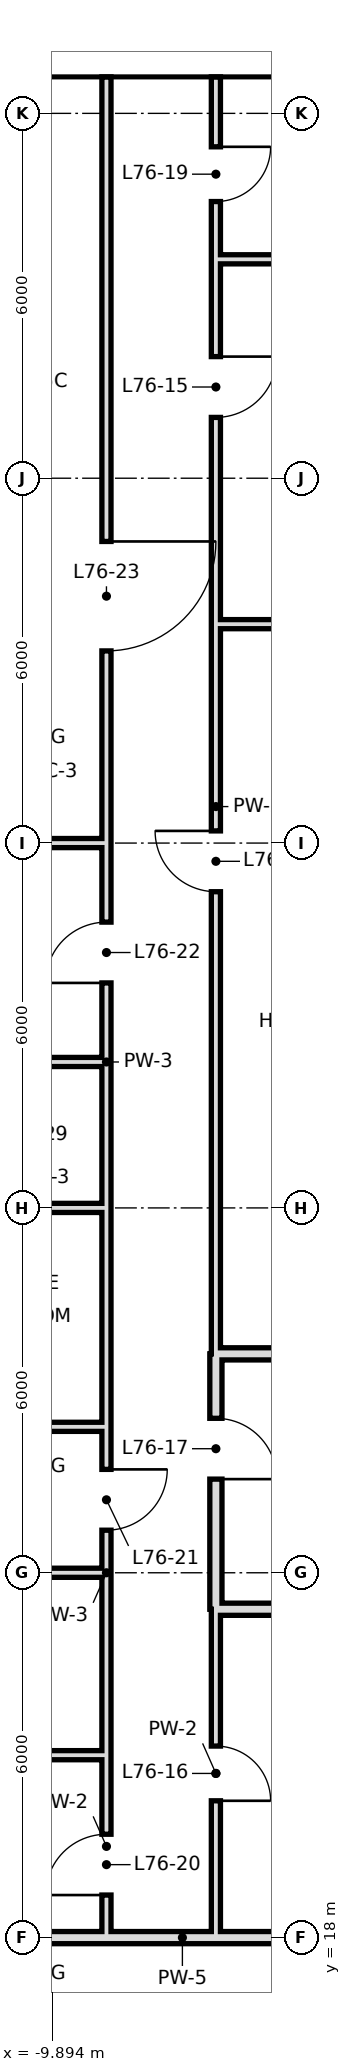
"""IFC4 building model, lengths in metres.
Left out: names, types, materials, properties, quantities, classifications, styles, units other than length and angle.
Written with IfcOpenShell. Run it as: python <this file> out.ifc"""

import sys

from ifc_helpers import new_model, si_unit, direction, frame, frame_2d, origin, place, context, subcontext, project, spatial, rectangle, extrude, element, fill, save


model = new_model("IFC4")
c1 = context("Model", 3, precision=1e-05, world=origin(), true_north=direction((0.0, 1.0)))
c2 = subcontext(c1, "Body", "Model", "MODEL_VIEW")
j1 = project(units=[si_unit("LENGTHUNIT", "METRE"), si_unit("PLANEANGLEUNIT", "RADIAN")], contexts=[c1])
p1 = place(None, origin())
s1 = spatial("IfcSite", under=j1, at=p1, CompositionType="ELEMENT")
p2 = place(p1, origin())
s2 = spatial("IfcBuilding", under=s1, at=p2, CompositionType="ELEMENT")
p3 = place(p2, frame((0.0, 0.0, 319.6)))
s3 = spatial("IfcBuildingStorey", under=s2, at=p3, CompositionType="ELEMENT", Elevation=319.6)
p4 = place(p3, frame((-7.2, 23.4, 0.0), z_axis=(0.0, 0.0, 1.0), x_axis=(0.0, 1.0, 0.0)))
e1 = element("IfcWall", 1, at=p4, inside=s3, PredefinedType="SOLIDWALL", context=c2, shape_type="SweptSolid", body=[
    extrude(rectangle(XDim=4.2, YDim=0.2, at=frame_2d((2.1, 0.0))), origin(), (0.0, 0.0, 1.0), 2.72),
])
p5 = place(p4, frame((2.14, 0.0, 0.0)))
e2 = element("IfcOpeningElement", 2, at=p5, cuts=e1, PredefinedType="OPENING", context=c2, shape_type="SweptSolid", body=[
    extrude(rectangle(XDim=1.0, YDim=2.4, at=frame_2d((0.5, 1.2))), frame((0.0, 0.11, 0.0), z_axis=(0.0, -1.0, 0.0), x_axis=(1.0, 0.0, 0.0)), (0.0, 0.0, 1.0), 0.22),
])
p6 = place(p3, frame((-7.2, 18.0, 0.0), z_axis=(0.0, 0.0, 1.0), x_axis=(0.0, 1.0, 0.0)))
e3 = element("IfcWall", 3, at=p6, inside=s3, PredefinedType="PARTITIONING", context=c2, shape_type="SweptSolid", body=[
    extrude(rectangle(XDim=5.4, YDim=0.15, at=frame_2d((2.7, 0.0))), origin(), (0.0, 0.0, 1.0), 3.42),
])
p7 = place(p6, frame((2.25, 0.0, 0.0)))
e4 = element("IfcOpeningElement", 4, at=p7, cuts=e3, PredefinedType="OPENING", context=c2, shape_type="SweptSolid", body=[
    extrude(rectangle(XDim=0.9, YDim=2.1, at=frame_2d((0.45, 1.05))), frame((0.0, 0.085, 0.0), z_axis=(0.0, -1.0, 0.0), x_axis=(1.0, 0.0, 0.0)), (0.0, 0.0, 1.0), 0.17),
])
p8 = place(p3, frame((-7.2, 27.6, 0.0), z_axis=(0.0, 0.0, 1.0), x_axis=(0.0, 1.0, 0.0)))
e5 = element("IfcWall", 5, at=p8, inside=s3, PredefinedType="PARTITIONING", context=c2, shape_type="SweptSolid", body=[
    extrude(rectangle(XDim=18.0, YDim=0.15, at=frame_2d((9.0, 0.0))), origin(), (0.0, 0.0, 1.0), 3.42),
])
p9 = place(p8, frame((15.4, 0.0, 0.0)))
e6 = element("IfcOpeningElement", 6, at=p9, cuts=e5, PredefinedType="OPENING", context=c2, shape_type="SweptSolid", body=[
    extrude(rectangle(XDim=1.0, YDim=2.4, at=frame_2d((0.5, 1.2))), frame((0.0, 0.085, 0.0), z_axis=(0.0, -1.0, 0.0), x_axis=(1.0, 0.0, 0.0)), (0.0, 0.0, 1.0), 0.17),
])
p10 = place(p8, frame((7.6, 0.0, 0.0)))
e7 = element("IfcOpeningElement", 7, at=p10, cuts=e5, PredefinedType="OPENING", context=c2, shape_type="SweptSolid", body=[
    extrude(rectangle(XDim=1.0, YDim=2.4, at=frame_2d((0.5, 1.2))), frame((0.0, 0.085, 0.0), z_axis=(0.0, -1.0, 0.0), x_axis=(1.0, 0.0, 0.0)), (0.0, 0.0, 1.0), 0.17),
])
p11 = place(p3, frame((-7.2, 45.6, 0.0), z_axis=(0.0, 0.0, 1.0), x_axis=(0.0, 1.0, 0.0)))
e8 = element("IfcWall", 8, at=p11, inside=s3, PredefinedType="PARTITIONING", context=c2, shape_type="SweptSolid", body=[
    extrude(rectangle(XDim=3.0, YDim=0.15, at=frame_2d((1.5, 0.0))), origin(), (0.0, 0.0, 1.0), 3.42),
])
p12 = place(p11, frame((0.95, 0.0, 0.0)))
e9 = element("IfcOpeningElement", 9, at=p12, cuts=e8, PredefinedType="OPENING", context=c2, shape_type="SweptSolid", body=[
    extrude(rectangle(XDim=0.9, YDim=2.4, at=frame_2d((0.45, 1.2))), frame((0.0, 0.085, 0.0), z_axis=(0.0, -1.0, 0.0), x_axis=(1.0, 0.0, 0.0)), (0.0, 0.0, 1.0), 0.17),
])
p13 = place(p3, frame((-9.0, 18.0, 0.0), z_axis=(0.0, 0.0, 1.0), x_axis=(0.0, 1.0, 0.0)))
e10 = element("IfcWall", 10, at=p13, inside=s3, PredefinedType="PARTITIONING", context=c2, shape_type="SweptSolid", body=[
    extrude(rectangle(XDim=3.0, YDim=0.15, at=frame_2d((1.5, 0.0))), origin(), (0.0, 0.0, 1.0), 3.42),
])
p14 = place(p13, frame((0.7, 0.0, 0.0)))
e11 = element("IfcOpeningElement", 11, at=p14, cuts=e10, PredefinedType="OPENING", context=c2, shape_type="SweptSolid", body=[
    extrude(rectangle(XDim=1.0, YDim=2.4, at=frame_2d((0.5, 1.2))), frame((0.0, 0.085, 0.0), z_axis=(0.0, -1.0, 0.0), x_axis=(1.0, 0.0, 0.0)), (0.0, 0.0, 1.0), 0.17),
])
p15 = place(p3, frame((-9.0, 24.0, 0.0), z_axis=(0.0, 0.0, 1.0), x_axis=(0.0, 1.0, 0.0)))
e12 = element("IfcWall", 12, at=p15, inside=s3, PredefinedType="PARTITIONING", context=c2, shape_type="SweptSolid", body=[
    extrude(rectangle(XDim=2.4, YDim=0.15, at=frame_2d((1.2, 0.0))), origin(), (0.0, 0.0, 1.0), 3.42),
])
p16 = place(p15, frame((0.7, 0.0, 0.0)))
e13 = element("IfcOpeningElement", 13, at=p16, cuts=e12, PredefinedType="OPENING", context=c2, shape_type="SweptSolid", body=[
    extrude(rectangle(XDim=1.0, YDim=2.4, at=frame_2d((0.5, 1.2))), frame((0.0, 0.085, 0.0), z_axis=(0.0, -1.0, 0.0), x_axis=(1.0, 0.0, 0.0)), (0.0, 0.0, 1.0), 0.17),
])
p17 = place(p3, frame((-9.0, 32.4, 0.0), z_axis=(0.0, 0.0, 1.0), x_axis=(0.0, 1.0, 0.0)))
e14 = element("IfcWall", 14, at=p17, inside=s3, PredefinedType="PARTITIONING", context=c2, shape_type="SweptSolid", body=[
    extrude(rectangle(XDim=16.2, YDim=0.15, at=frame_2d((8.1, 0.0))), origin(), (0.0, 0.0, 1.0), 3.42),
])
p18 = place(p17, frame((1.3, 0.0, 0.0)))
e15 = element("IfcOpeningElement", 15, at=p18, cuts=e14, PredefinedType="OPENING", context=c2, shape_type="SweptSolid", body=[
    extrude(rectangle(XDim=1.0, YDim=2.4, at=frame_2d((0.5, 1.2))), frame((0.0, 0.085, 0.0), z_axis=(0.0, -1.0, 0.0), x_axis=(1.0, 0.0, 0.0)), (0.0, 0.0, 1.0), 0.17),
])
p19 = place(p17, frame((6.76, 0.0, 0.0)))
e16 = element("IfcOpeningElement", 16, at=p19, cuts=e14, PredefinedType="OPENING", context=c2, shape_type="SweptSolid", body=[
    extrude(rectangle(XDim=1.8, YDim=2.4, at=frame_2d((0.9, 1.2))), frame((0.0, 0.085, 0.0), z_axis=(0.0, -1.0, 0.0), x_axis=(1.0, 0.0, 0.0)), (0.0, 0.0, 1.0), 0.17),
])
p20 = place(p3, frame((-9.0, 21.0, 0.0), z_axis=(0.0, 0.0, 1.0), x_axis=(0.0, 1.0, 0.0)))
e17 = element("IfcWall", 17, at=p20, inside=s3, PredefinedType="PARTITIONING", context=c2, shape_type="SweptSolid", body=[
    extrude(rectangle(XDim=3.0, YDim=0.15, at=frame_2d((1.5, 0.0))), origin(), (0.0, 0.0, 1.0), 3.42),
])
p21 = place(p3, frame((-9.0, 26.4, 0.0), z_axis=(0.0, 0.0, 1.0), x_axis=(0.0, 1.0, 0.0)))
e18 = element("IfcWall", 18, at=p21, inside=s3, PredefinedType="PARTITIONING", context=c2, shape_type="SweptSolid", body=[
    extrude(rectangle(XDim=6.0, YDim=0.15, at=frame_2d((3.0, 0.0))), origin(), (0.0, 0.0, 1.0), 3.42),
])
p22 = place(p3, frame((-18.6, 18.0, 0.0), z_axis=(0.0, 0.0, 1.0), x_axis=(1.0, 0.0, 0.0)))
e19 = element("IfcWall", 19, at=p22, inside=s3, PredefinedType="SOLIDWALL", context=c2, shape_type="SweptSolid", body=[
    extrude(rectangle(XDim=21.698, YDim=0.2, at=frame_2d((10.849, 0.0))), origin(), (0.0, 0.0, 1.0), 2.72),
])
p23 = place(p3, frame((-12.0, 21.0, 0.0), z_axis=(0.0, 0.0, 1.0), x_axis=(1.0, 0.0, 0.0)))
e20 = element("IfcWall", 20, at=p23, inside=s3, PredefinedType="PARTITIONING", context=c2, shape_type="SweptSolid", body=[
    extrude(rectangle(XDim=3.0, YDim=0.15, at=frame_2d((1.5, 0.0))), origin(), (0.0, 0.0, 1.0), 3.42),
])
p24 = place(p3, frame((-7.2, 23.4, 0.0), z_axis=(0.0, 0.0, 1.0), x_axis=(1.0, 0.0, 0.0)))
e21 = element("IfcWall", 21, at=p24, inside=s3, PredefinedType="SOLIDWALL", context=c2, shape_type="SweptSolid", body=[
    extrude(rectangle(XDim=10.3, YDim=0.2, at=frame_2d((5.15, 0.0))), origin(), (0.0, 0.0, 1.0), 2.72),
])
p25 = place(p3, frame((-12.0, 24.0, 0.0), z_axis=(0.0, 0.0, 1.0), x_axis=(1.0, 0.0, 0.0)))
e22 = element("IfcWall", 22, at=p25, inside=s3, PredefinedType="PARTITIONING", context=c2, shape_type="SweptSolid", body=[
    extrude(rectangle(XDim=3.0, YDim=0.15, at=frame_2d((1.5, 0.0))), origin(), (0.0, 0.0, 1.0), 2.72),
])
p26 = place(p3, frame((-12.0, 26.4, 0.0), z_axis=(0.0, 0.0, 1.0), x_axis=(1.0, 0.0, 0.0)))
e23 = element("IfcWall", 23, at=p26, inside=s3, PredefinedType="PARTITIONING", context=c2, shape_type="SweptSolid", body=[
    extrude(rectangle(XDim=3.0, YDim=0.15, at=frame_2d((1.5, 0.0))), origin(), (0.0, 0.0, 1.0), 3.42),
])
p27 = place(p3, frame((-7.2, 27.6, 0.0), z_axis=(0.0, 0.0, 1.0), x_axis=(1.0, 0.0, 0.0)))
e24 = element("IfcWall", 24, at=p27, inside=s3, PredefinedType="SOLIDWALL", context=c2, shape_type="SweptSolid", body=[
    extrude(rectangle(XDim=10.3, YDim=0.2, at=frame_2d((5.15, 0.0))), origin(), (0.0, 0.0, 1.0), 2.72),
])
p28 = place(p3, frame((-12.0, 30.0, 0.0), z_axis=(0.0, 0.0, 1.0), x_axis=(1.0, 0.0, 0.0)))
e25 = element("IfcWall", 25, at=p28, inside=s3, PredefinedType="PARTITIONING", context=c2, shape_type="SweptSolid", body=[
    extrude(rectangle(XDim=3.0, YDim=0.15, at=frame_2d((1.5, 0.0))), origin(), (0.0, 0.0, 1.0), 2.72),
])
p29 = place(p3, frame((-12.0, 32.4, 0.0), z_axis=(0.0, 0.0, 1.0), x_axis=(1.0, 0.0, 0.0)))
e26 = element("IfcWall", 26, at=p29, inside=s3, PredefinedType="PARTITIONING", context=c2, shape_type="SweptSolid", body=[
    extrude(rectangle(XDim=3.0, YDim=0.15, at=frame_2d((1.5, 0.0))), origin(), (0.0, 0.0, 1.0), 3.42),
])
p30 = place(p3, frame((-18.0, 36.0, 0.0), z_axis=(0.0, 0.0, 1.0), x_axis=(1.0, 0.0, 0.0)))
e27 = element("IfcWall", 27, at=p30, inside=s3, PredefinedType="PARTITIONING", context=c2, shape_type="SweptSolid", body=[
    extrude(rectangle(XDim=9.0, YDim=0.15, at=frame_2d((4.5, 0.0))), origin(), (0.0, 0.0, 1.0), 2.72),
])
for number, where, z_axis, x_axis in (
    (28, (-7.2, 39.6, 0.0), (0.0, 0.0, 1.0), (1.0, 0.0, 0.0)),
    (29, (-7.2, 45.6, 0.0), (0.0, 0.0, 1.0), (1.0, 0.0, 0.0)),
):
    element("IfcWall", number, at=place(p3, frame(where, z_axis=z_axis, x_axis=x_axis)), inside=s3, PredefinedType="PARTITIONING", context=c2, shape_type="SweptSolid", body=[
        extrude(rectangle(XDim=10.3, YDim=0.15, at=frame_2d((5.15, 0.0))), origin(), (0.0, 0.0, 1.0), 3.42),
    ])
p31 = place(p9, origin())
e30 = element("IfcDoor", 30, at=p31, inside=s3, OperationType="SINGLE_SWING_RIGHT", PredefinedType="DOOR", context=c2, shape_type="SweptSolid", body=[
    extrude(rectangle(XDim=1.0, YDim=2.4, at=frame_2d((0.5, 1.2))), frame((0.0, 0.025, 0.0), z_axis=(0.0, -1.0, 0.0), x_axis=(1.0, 0.0, 0.0)), (0.0, 0.0, 1.0), 0.05),
])
fill(e6, e30)
p32 = place(p7, frame((0.9, 0.0, 0.0), z_axis=(0.0, 0.0, 1.0), x_axis=(-1.0, 0.0, 0.0)))
e31 = element("IfcDoor", 31, at=p32, inside=s3, OperationType="SINGLE_SWING_RIGHT", PredefinedType="DOOR", context=c2, shape_type="SweptSolid", body=[
    extrude(rectangle(XDim=0.9, YDim=2.1, at=frame_2d((0.45, 1.05))), frame((0.0, 0.025, 0.0), z_axis=(0.0, -1.0, 0.0), x_axis=(1.0, 0.0, 0.0)), (0.0, 0.0, 1.0), 0.05),
])
fill(e4, e31)
p33 = place(p5, frame((1.0, 0.0, 0.0), z_axis=(0.0, 0.0, 1.0), x_axis=(-1.0, 0.0, 0.0)))
e32 = element("IfcDoor", 32, at=p33, inside=s3, OperationType="SINGLE_SWING_RIGHT", PredefinedType="DOOR", context=c2, shape_type="SweptSolid", body=[
    extrude(rectangle(XDim=1.0, YDim=2.4, at=frame_2d((0.5, 1.2))), frame((0.0, 0.025, 0.0), z_axis=(0.0, -1.0, 0.0), x_axis=(1.0, 0.0, 0.0)), (0.0, 0.0, 1.0), 0.05),
])
fill(e2, e32)
p34 = place(p10, frame((1.0, 0.0, 0.0), z_axis=(0.0, 0.0, 1.0), x_axis=(-1.0, 0.0, 0.0)))
e33 = element("IfcDoor", 33, at=p34, inside=s3, OperationType="SINGLE_SWING_LEFT", PredefinedType="DOOR", context=c2, shape_type="SweptSolid", body=[
    extrude(rectangle(XDim=1.0, YDim=2.4, at=frame_2d((0.5, 1.2))), frame((0.0, 0.025, 0.0), z_axis=(0.0, -1.0, 0.0), x_axis=(1.0, 0.0, 0.0)), (0.0, 0.0, 1.0), 0.05),
])
fill(e7, e33)
p35 = place(p12, origin())
e34 = element("IfcDoor", 34, at=p35, inside=s3, OperationType="SINGLE_SWING_RIGHT", PredefinedType="DOOR", context=c2, shape_type="SweptSolid", body=[
    extrude(rectangle(XDim=0.9, YDim=2.4, at=frame_2d((0.45, 1.2))), frame((0.0, 0.025, 0.0), z_axis=(0.0, -1.0, 0.0), x_axis=(1.0, 0.0, 0.0)), (0.0, 0.0, 1.0), 0.05),
])
fill(e9, e34)
p36 = place(p14, origin())
e35 = element("IfcDoor", 35, at=p36, inside=s3, OperationType="SINGLE_SWING_LEFT", PredefinedType="DOOR", context=c2, shape_type="SweptSolid", body=[
    extrude(rectangle(XDim=1.0, YDim=2.4, at=frame_2d((0.5, 1.2))), frame((0.0, 0.025, 0.0), z_axis=(0.0, -1.0, 0.0), x_axis=(1.0, 0.0, 0.0)), (0.0, 0.0, 1.0), 0.05),
])
fill(e11, e35)
p37 = place(p16, origin())
e36 = element("IfcDoor", 36, at=p37, inside=s3, OperationType="SINGLE_SWING_RIGHT", PredefinedType="DOOR", context=c2, shape_type="SweptSolid", body=[
    extrude(rectangle(XDim=1.0, YDim=2.4, at=frame_2d((0.5, 1.2))), frame((0.0, 0.025, 0.0), z_axis=(0.0, -1.0, 0.0), x_axis=(1.0, 0.0, 0.0)), (0.0, 0.0, 1.0), 0.05),
])
fill(e13, e36)
p38 = place(p18, origin())
e37 = element("IfcDoor", 37, at=p38, inside=s3, OperationType="SINGLE_SWING_LEFT", PredefinedType="DOOR", context=c2, shape_type="SweptSolid", body=[
    extrude(rectangle(XDim=1.0, YDim=2.4, at=frame_2d((0.5, 1.2))), frame((0.0, 0.025, 0.0), z_axis=(0.0, -1.0, 0.0), x_axis=(1.0, 0.0, 0.0)), (0.0, 0.0, 1.0), 0.05),
])
fill(e15, e37)
p39 = place(p19, origin())
e38 = element("IfcDoor", 38, at=p39, inside=s3, OperationType="SINGLE_SWING_RIGHT", PredefinedType="DOOR", context=c2, shape_type="SweptSolid", body=[
    extrude(rectangle(XDim=1.8, YDim=2.4, at=frame_2d((0.9, 1.2))), frame((0.0, 0.025, 0.0), z_axis=(0.0, -1.0, 0.0), x_axis=(1.0, 0.0, 0.0)), (0.0, 0.0, 1.0), 0.05),
])
fill(e16, e38)
save(model, sys.argv[1])
